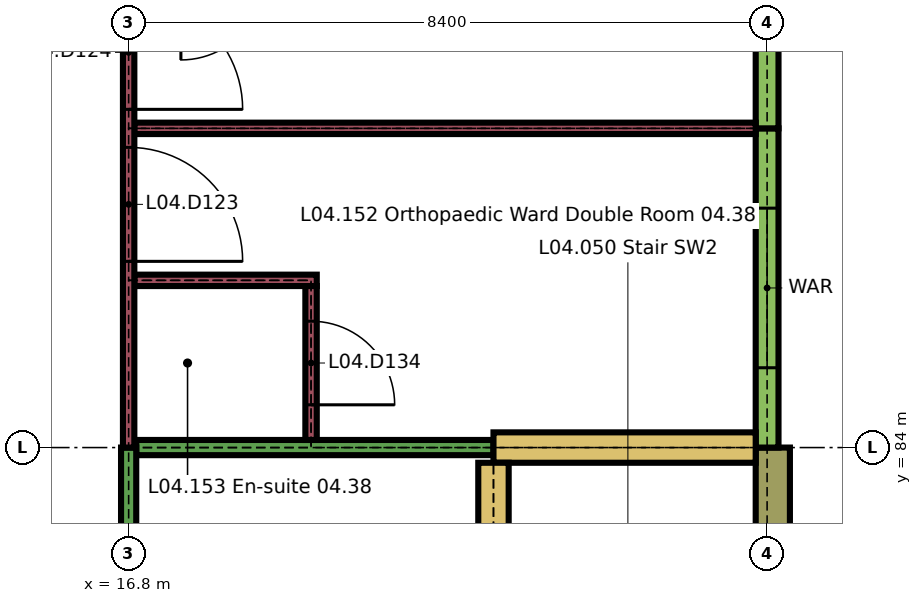
"""IFC4 building model, lengths in metres.
Left out: names, types, materials, properties, quantities, classifications, styles, units other than length and angle.
Written with IfcOpenShell. Run it as: python <this file> out.ifc"""

import sys

from ifc_helpers import new_model, si_unit, direction, frame, frame_2d, origin, place, context, subcontext, project, spatial, rectangle, extrude, element, fill, save


model = new_model("IFC4")
c1 = context("Model", 3, precision=1e-05, world=origin(), true_north=direction((0.0, 1.0)))
c2 = subcontext(c1, "Body", "Model", "MODEL_VIEW")
j1 = project(units=[si_unit("LENGTHUNIT", "METRE"), si_unit("PLANEANGLEUNIT", "RADIAN")], contexts=[c1])
p1 = place(None, origin())
s1 = spatial("IfcSite", under=j1, at=p1, CompositionType="ELEMENT")
p2 = place(p1, origin())
s2 = spatial("IfcBuilding", under=s1, at=p2, CompositionType="ELEMENT")
p3 = place(p2, frame((0.0, 0.0, 18.9)))
s3 = spatial("IfcBuildingStorey", under=s2, at=p3, CompositionType="ELEMENT", Elevation=18.9)
p4 = place(p3, frame((25.275, 80.15, 0.0), z_axis=(0.0, 0.0, 1.0), x_axis=(0.0, 1.0, 0.0)))
e1 = element("IfcWall", 1, at=p4, inside=s3, PredefinedType="SOLIDWALL", context=c2, shape_type="SweptSolid", body=[
    extrude(rectangle(XDim=3.85, YDim=0.45, at=frame_2d((1.925, 0.0))), origin(), (0.0, 0.0, 1.0), 3.26),
])
p5 = place(p3, frame((25.2, 84.0, 0.0), z_axis=(0.0, 0.0, 1.0), x_axis=(0.0, 1.0, 0.0)))
e2 = element("IfcWall", 2, at=p5, inside=s3, PredefinedType="SOLIDWALL", context=c2, shape_type="SweptSolid", body=[
    extrude(rectangle(XDim=4.2, YDim=0.3, at=frame_2d((2.1, 0.0))), origin(), (0.0, 0.0, 1.0), 2.96),
])
p6 = place(p5, frame((1.05, 0.0, 0.9)))
e3 = element("IfcOpeningElement", 3, at=p6, cuts=e2, PredefinedType="OPENING", context=c2, shape_type="SweptSolid", body=[
    extrude(rectangle(XDim=2.1, YDim=1.5, at=frame_2d((1.05, 0.75))), frame((0.0, 0.16, 0.0), z_axis=(0.0, -1.0, 0.0), x_axis=(1.0, 0.0, 0.0)), (0.0, 0.0, 1.0), 0.32),
])
p7 = place(p3, frame((25.2, 88.2, 0.0), z_axis=(0.0, 0.0, 1.0), x_axis=(0.0, 1.0, 0.0)))
e4 = element("IfcWall", 4, at=p7, inside=s3, PredefinedType="SOLIDWALL", context=c2, shape_type="SweptSolid", body=[
    extrude(rectangle(XDim=3.85, YDim=0.3, at=frame_2d((1.925, 0.0))), origin(), (0.0, 0.0, 1.0), 2.96),
])
p8 = place(p7, frame((1.05, 0.0, 0.9)))
e5 = element("IfcOpeningElement", 5, at=p8, cuts=e4, PredefinedType="OPENING", context=c2, shape_type="SweptSolid", body=[
    extrude(rectangle(XDim=2.1, YDim=1.5, at=frame_2d((1.05, 0.75))), frame((0.0, 0.16, 0.0), z_axis=(0.0, -1.0, 0.0), x_axis=(1.0, 0.0, 0.0)), (0.0, 0.0, 1.0), 0.32),
])
p9 = place(p3, frame((16.9, 84.0, 0.0), z_axis=(0.0, 0.0, 1.0), x_axis=(1.0, 0.0, 0.0)))
e6 = element("IfcWall", 6, at=p9, inside=s3, PredefinedType="PARTITIONING", context=c2, shape_type="SweptSolid", body=[
    extrude(rectangle(XDim=4.7, YDim=0.2, at=frame_2d((2.35, 0.0))), origin(), (0.0, 0.0, 1.0), 3.26),
])
p10 = place(p3, frame((21.6, 84.0, 0.0), z_axis=(0.0, 0.0, 1.0), x_axis=(1.0, 0.0, 0.0)))
e7 = element("IfcWall", 7, at=p10, inside=s3, PredefinedType="SHEAR", context=c2, shape_type="SweptSolid", body=[
    extrude(rectangle(XDim=3.45, YDim=0.4, at=frame_2d((1.725, 0.0))), origin(), (0.0, 0.0, 1.0), 3.26),
])
p11 = place(p3, frame((16.875, 86.2, 0.0), z_axis=(0.0, 0.0, 1.0), x_axis=(1.0, 0.0, 0.0)))
e8 = element("IfcWall", 8, at=p11, inside=s3, PredefinedType="PARTITIONING", context=c2, shape_type="SweptSolid", body=[
    extrude(rectangle(XDim=2.4, YDim=0.15, at=frame_2d((1.2, 0.0))), origin(), (0.0, 0.0, 1.0), 3.26),
])
p12 = place(p3, frame((16.875, 88.2, 0.0), z_axis=(0.0, 0.0, 1.0), x_axis=(1.0, 0.0, 0.0)))
e9 = element("IfcWall", 9, at=p12, inside=s3, PredefinedType="PARTITIONING", context=c2, shape_type="SweptSolid", body=[
    extrude(rectangle(XDim=8.175, YDim=0.15, at=frame_2d((4.087, 0.0))), origin(), (0.0, 0.0, 1.0), 3.26),
])
p13 = place(p3, frame((16.8, 75.6, 0.0), z_axis=(0.0, 0.0, 1.0), x_axis=(0.0, 1.0, 0.0)))
e10 = element("IfcWall", 10, at=p13, inside=s3, PredefinedType="PARTITIONING", context=c2, shape_type="SweptSolid", body=[
    extrude(rectangle(XDim=8.4, YDim=0.2, at=frame_2d((4.2, 0.0))), origin(), (0.0, 0.0, 1.0), 3.26),
])
p14 = place(p13, frame((3.2, 0.0, 0.0)))
e11 = element("IfcOpeningElement", 11, at=p14, cuts=e10, PredefinedType="OPENING", context=c2, shape_type="SweptSolid", body=[
    extrude(rectangle(XDim=2.0, YDim=2.4, at=frame_2d((1.0, 1.2))), frame((0.0, 0.11, 0.0), z_axis=(0.0, -1.0, 0.0), x_axis=(1.0, 0.0, 0.0)), (0.0, 0.0, 1.0), 0.22),
])
p15 = place(p3, frame((16.8, 84.0, 0.0), z_axis=(0.0, 0.0, 1.0), x_axis=(0.0, 1.0, 0.0)))
e12 = element("IfcWall", 12, at=p15, inside=s3, PredefinedType="PARTITIONING", context=c2, shape_type="SweptSolid", body=[
    extrude(rectangle(XDim=8.05, YDim=0.15, at=frame_2d((4.025, 0.0))), origin(), (0.0, 0.0, 1.0), 3.26),
])
p16 = place(p15, frame((2.45, 0.0, 0.0)))
e13 = element("IfcOpeningElement", 13, at=p16, cuts=e12, PredefinedType="OPENING", context=c2, shape_type="SweptSolid", body=[
    extrude(rectangle(XDim=1.5, YDim=2.4, at=frame_2d((0.75, 1.2))), frame((0.0, 0.085, 0.0), z_axis=(0.0, -1.0, 0.0), x_axis=(1.0, 0.0, 0.0)), (0.0, 0.0, 1.0), 0.17),
])
p17 = place(p15, frame((4.45, 0.0, 0.0)))
e14 = element("IfcOpeningElement", 14, at=p17, cuts=e12, PredefinedType="OPENING", context=c2, shape_type="SweptSolid", body=[
    extrude(rectangle(XDim=1.5, YDim=2.4, at=frame_2d((0.75, 1.2))), frame((0.0, 0.085, 0.0), z_axis=(0.0, -1.0, 0.0), x_axis=(1.0, 0.0, 0.0)), (0.0, 0.0, 1.0), 0.17),
])
p18 = place(p3, frame((19.2, 84.1, 0.0), z_axis=(0.0, 0.0, 1.0), x_axis=(0.0, 1.0, 0.0)))
e15 = element("IfcWall", 15, at=p18, inside=s3, PredefinedType="PARTITIONING", context=c2, shape_type="SweptSolid", body=[
    extrude(rectangle(XDim=2.025, YDim=0.15, at=frame_2d((1.012, 0.0))), origin(), (0.0, 0.0, 1.0), 3.26),
])
p19 = place(p18, frame((0.462, 0.0, 0.0)))
e16 = element("IfcOpeningElement", 16, at=p19, cuts=e15, PredefinedType="OPENING", context=c2, shape_type="SweptSolid", body=[
    extrude(rectangle(XDim=1.1, YDim=2.1, at=frame_2d((0.55, 1.05))), frame((0.0, 0.085, 0.0), z_axis=(0.0, -1.0, 0.0), x_axis=(1.0, 0.0, 0.0)), (0.0, 0.0, 1.0), 0.17),
])
p20 = place(p3, frame((21.6, 75.8, 0.0), z_axis=(0.0, 0.0, 1.0), x_axis=(0.0, 1.0, 0.0)))
e17 = element("IfcWall", 17, at=p20, inside=s3, PredefinedType="SHEAR", context=c2, shape_type="SweptSolid", body=[
    extrude(rectangle(XDim=8.0, YDim=0.4, at=frame_2d((4.0, 0.0))), origin(), (0.0, 0.0, 1.0), 3.26),
])
p21 = place(p20, frame((0.4, 0.0, 0.0)))
e18 = element("IfcOpeningElement", 18, at=p21, cuts=e17, PredefinedType="OPENING", context=c2, shape_type="SweptSolid", body=[
    extrude(rectangle(XDim=1.2, YDim=2.1, at=frame_2d((0.6, 1.05))), frame((0.0, 0.21, 0.0), z_axis=(0.0, -1.0, 0.0), x_axis=(1.0, 0.0, 0.0)), (0.0, 0.0, 1.0), 0.42),
])
p22 = place(p6, origin())
e19 = element("IfcWindow", 19, at=p22, inside=s3, PartitioningType="DOUBLE_PANEL_VERTICAL", PredefinedType="WINDOW", context=c2, shape_type="SweptSolid", body=[
    extrude(rectangle(XDim=2.1, YDim=1.5, at=frame_2d((1.05, 0.75))), frame((0.0, 0.05, 0.0), z_axis=(0.0, -1.0, 0.0), x_axis=(1.0, 0.0, 0.0)), (0.0, 0.0, 1.0), 0.1),
])
fill(e3, e19)
p23 = place(p16, origin())
e20 = element("IfcDoor", 20, at=p23, inside=s3, OperationType="SINGLE_SWING_LEFT", PredefinedType="DOOR", context=c2, shape_type="SweptSolid", body=[
    extrude(rectangle(XDim=1.5, YDim=2.4, at=frame_2d((0.75, 1.2))), frame((0.0, 0.03, 0.0), z_axis=(0.0, -1.0, 0.0), x_axis=(1.0, 0.0, 0.0)), (0.0, 0.0, 1.0), 0.06),
])
fill(e13, e20)
p24 = place(p17, origin())
e21 = element("IfcDoor", 21, at=p24, inside=s3, OperationType="SINGLE_SWING_LEFT", PredefinedType="DOOR", context=c2, shape_type="SweptSolid", body=[
    extrude(rectangle(XDim=1.5, YDim=2.4, at=frame_2d((0.75, 1.2))), frame((0.0, 0.03, 0.0), z_axis=(0.0, -1.0, 0.0), x_axis=(1.0, 0.0, 0.0)), (0.0, 0.0, 1.0), 0.06),
])
fill(e14, e21)
p25 = place(p19, origin())
e22 = element("IfcDoor", 22, at=p25, inside=s3, OperationType="SINGLE_SWING_LEFT", PredefinedType="DOOR", context=c2, shape_type="SweptSolid", body=[
    extrude(rectangle(XDim=1.1, YDim=2.1, at=frame_2d((0.55, 1.05))), frame((0.0, 0.025, 0.0), z_axis=(0.0, -1.0, 0.0), x_axis=(1.0, 0.0, 0.0)), (0.0, 0.0, 1.0), 0.05),
])
fill(e16, e22)
save(model, sys.argv[1])
